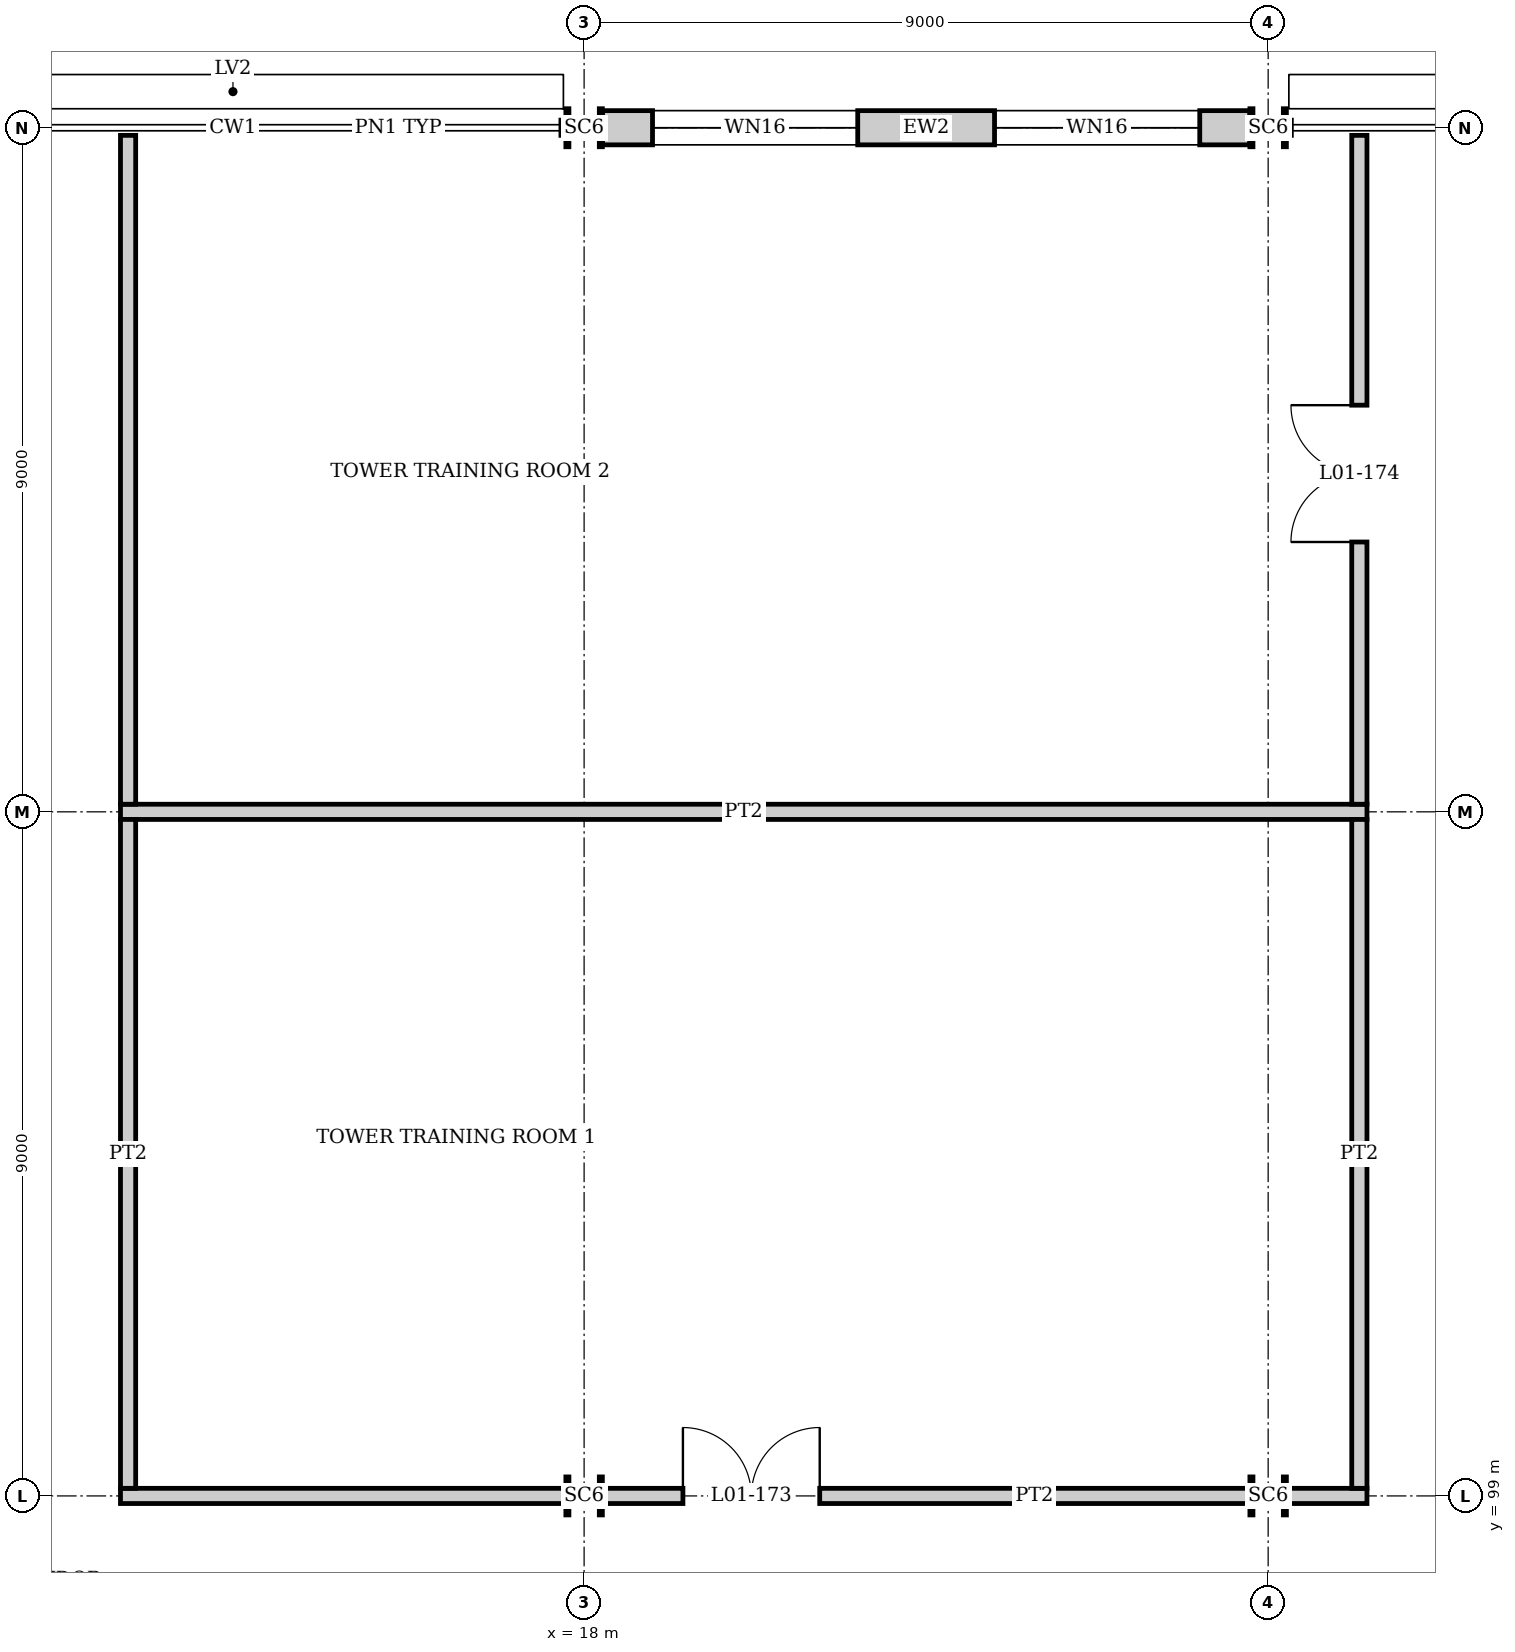
"""IFC4 building model, lengths in metres.
Left out: names, types, materials, properties, quantities, classifications, styles, units other than length and angle.
Written with IfcOpenShell. Run it as: python <this file> out.ifc"""

import sys

from ifc_helpers import new_model, si_unit, direction, frame, frame_2d, origin, origin_2d, place, context, subcontext, project, spatial, rectangle, i_section, extrude, element, fill, save


model = new_model("IFC4")
c1 = context("Model", 3, precision=1e-05, world=origin(), true_north=direction((0.0, 1.0)))
c2 = subcontext(c1, "Body", "Model", "MODEL_VIEW")
j1 = project(units=[si_unit("LENGTHUNIT", "METRE"), si_unit("PLANEANGLEUNIT", "RADIAN")], contexts=[c1])
p1 = place(None, origin())
s1 = spatial("IfcSite", under=j1, at=p1, CompositionType="ELEMENT")
p2 = place(p1, origin())
s2 = spatial("IfcBuilding", under=s1, at=p2, CompositionType="ELEMENT")
p3 = place(p2, frame((0.0, 0.0, 6.0)))
s3 = spatial("IfcBuildingStorey", under=s2, at=p3, CompositionType="ELEMENT", Elevation=6.0)
for number, where, z_axis, x_axis in (
    (1, (18.0, 99.0, 0.0), (0.0, 0.0, 1.0), (0.0, 1.0, 0.0)),
    (2, (18.0, 117.0, 0.0), (0.0, 0.0, 1.0), (0.0, 1.0, 0.0)),
    (3, (27.0, 99.0, 0.0), (0.0, 0.0, 1.0), (0.0, 1.0, 0.0)),
    (4, (27.0, 117.0, 0.0), (0.0, 0.0, 1.0), (0.0, 1.0, 0.0)),
):
    element("IfcColumn", number, at=place(p3, frame(where, z_axis=z_axis, x_axis=x_axis)), inside=s3, PredefinedType="COLUMN", context=c2, shape_type="SweptSolid", body=[
        extrude(i_section(OverallWidth=0.5, OverallDepth=0.48, WebThickness=0.04, FlangeThickness=0.04, at=origin_2d()), origin(), (0.0, 0.0, 1.0), 4.5),
    ])
p4 = place(p3, frame((18.24, 117.0, 0.0), z_axis=(0.0, 0.0, 1.0), x_axis=(1.0, 0.0, 0.0)))
e5 = element("IfcWall", 5, at=p4, inside=s3, PredefinedType="SOLIDWALL", context=c2, shape_type="SweptSolid", body=[
    extrude(rectangle(XDim=8.52, YDim=0.45, at=frame_2d((4.26, 0.0))), origin(), (0.0, 0.0, 1.0), 3.55),
])
p5 = place(p4, frame((0.66, 0.0, 0.9)))
e6 = element("IfcOpeningElement", 6, at=p5, cuts=e5, PredefinedType="OPENING", context=c2, shape_type="SweptSolid", body=[
    extrude(rectangle(XDim=2.7, YDim=1.8, at=frame_2d((1.35, 0.9))), frame((0.0, 0.235, 0.0), z_axis=(0.0, -1.0, 0.0), x_axis=(1.0, 0.0, 0.0)), (0.0, 0.0, 1.0), 0.47),
])
p6 = place(p4, frame((5.16, 0.0, 0.9)))
e7 = element("IfcOpeningElement", 7, at=p6, cuts=e5, PredefinedType="OPENING", context=c2, shape_type="SweptSolid", body=[
    extrude(rectangle(XDim=2.7, YDim=1.8, at=frame_2d((1.35, 0.9))), frame((0.0, 0.235, 0.0), z_axis=(0.0, -1.0, 0.0), x_axis=(1.0, 0.0, 0.0)), (0.0, 0.0, 1.0), 0.47),
])
p7 = place(p3, frame((11.9, 99.0, 0.0), z_axis=(0.0, 0.0, 1.0), x_axis=(1.0, 0.0, 0.0)))
e8 = element("IfcWall", 8, at=p7, inside=s3, PredefinedType="PARTITIONING", context=c2, shape_type="SweptSolid", body=[
    extrude(rectangle(XDim=5.85, YDim=0.2, at=frame_2d((2.925, 0.0))), origin(), (0.0, 0.0, 1.0), 3.64),
])
p8 = place(p3, frame((18.25, 99.0, 0.0), z_axis=(0.0, 0.0, 1.0), x_axis=(1.0, 0.0, 0.0)))
e9 = element("IfcWall", 9, at=p8, inside=s3, PredefinedType="PARTITIONING", context=c2, shape_type="SweptSolid", body=[
    extrude(rectangle(XDim=8.5, YDim=0.2, at=frame_2d((4.25, 0.0))), origin(), (0.0, 0.0, 1.0), 3.64),
])
p9 = place(p8, frame((1.05, 0.0, 0.0)))
e10 = element("IfcOpeningElement", 10, at=p9, cuts=e9, PredefinedType="OPENING", context=c2, shape_type="SweptSolid", body=[
    extrude(rectangle(XDim=1.8, YDim=2.1, at=frame_2d((0.9, 1.05))), frame((0.0, 0.11, 0.0), z_axis=(0.0, -1.0, 0.0), x_axis=(1.0, 0.0, 0.0)), (0.0, 0.0, 1.0), 0.22),
])
p10 = place(p3, frame((27.25, 99.0, 0.0), z_axis=(0.0, 0.0, 1.0), x_axis=(1.0, 0.0, 0.0)))
e11 = element("IfcWall", 11, at=p10, inside=s3, PredefinedType="PARTITIONING", context=c2, shape_type="SweptSolid", body=[
    extrude(rectangle(XDim=1.05, YDim=0.2, at=frame_2d((0.525, 0.0))), origin(), (0.0, 0.0, 1.0), 3.64),
])
p11 = place(p3, frame((11.9, 108.0, 0.0), z_axis=(0.0, 0.0, 1.0), x_axis=(1.0, 0.0, 0.0)))
e12 = element("IfcWall", 12, at=p11, inside=s3, PredefinedType="PARTITIONING", context=c2, shape_type="SweptSolid", body=[
    extrude(rectangle(XDim=16.4, YDim=0.2, at=frame_2d((8.2, 0.0))), origin(), (0.0, 0.0, 1.0), 3.55),
])
p12 = place(p3, frame((12.0, 99.1, 0.0), z_axis=(0.0, 0.0, 1.0), x_axis=(0.0, 1.0, 0.0)))
e13 = element("IfcWall", 13, at=p12, inside=s3, PredefinedType="PARTITIONING", context=c2, shape_type="SweptSolid", body=[
    extrude(rectangle(XDim=8.8, YDim=0.2, at=frame_2d((4.4, 0.0))), origin(), (0.0, 0.0, 1.0), 3.64),
])
p13 = place(p3, frame((12.0, 108.1, 0.0), z_axis=(0.0, 0.0, 1.0), x_axis=(0.0, 1.0, 0.0)))
e14 = element("IfcWall", 14, at=p13, inside=s3, PredefinedType="PARTITIONING", context=c2, shape_type="SweptSolid", body=[
    extrude(rectangle(XDim=8.8, YDim=0.2, at=frame_2d((4.4, 0.0))), origin(), (0.0, 0.0, 1.0), 4.35),
])
p14 = place(p3, frame((28.2, 99.1, 0.0), z_axis=(0.0, 0.0, 1.0), x_axis=(0.0, 1.0, 0.0)))
e15 = element("IfcWall", 15, at=p14, inside=s3, PredefinedType="PARTITIONING", context=c2, shape_type="SweptSolid", body=[
    extrude(rectangle(XDim=8.8, YDim=0.2, at=frame_2d((4.4, 0.0))), origin(), (0.0, 0.0, 1.0), 3.64),
])
p15 = place(p3, frame((28.2, 108.1, 0.0), z_axis=(0.0, 0.0, 1.0), x_axis=(0.0, 1.0, 0.0)))
e16 = element("IfcWall", 16, at=p15, inside=s3, PredefinedType="PARTITIONING", context=c2, shape_type="SweptSolid", body=[
    extrude(rectangle(XDim=8.8, YDim=0.2, at=frame_2d((4.4, 0.0))), origin(), (0.0, 0.0, 1.0), 4.35),
])
p16 = place(p15, frame((3.45, 0.0, 0.0)))
e17 = element("IfcOpeningElement", 17, at=p16, cuts=e16, PredefinedType="OPENING", context=c2, shape_type="SweptSolid", body=[
    extrude(rectangle(XDim=1.8, YDim=2.1, at=frame_2d((0.9, 1.05))), frame((0.0, 0.11, 0.0), z_axis=(0.0, -1.0, 0.0), x_axis=(1.0, 0.0, 0.0)), (0.0, 0.0, 1.0), 0.22),
])
p17 = place(p5, origin())
e18 = element("IfcWindow", 18, at=p17, inside=s3, PartitioningType="SINGLE_PANEL", PredefinedType="WINDOW", context=c2, shape_type="SweptSolid", body=[
    extrude(rectangle(XDim=2.7, YDim=1.8, at=frame_2d((1.35, 0.9))), frame((0.0, 0.03, 0.0), z_axis=(0.0, -1.0, 0.0), x_axis=(1.0, 0.0, 0.0)), (0.0, 0.0, 1.0), 0.06),
])
fill(e6, e18)
p18 = place(p6, origin())
e19 = element("IfcWindow", 19, at=p18, inside=s3, PartitioningType="SINGLE_PANEL", PredefinedType="WINDOW", context=c2, shape_type="SweptSolid", body=[
    extrude(rectangle(XDim=2.7, YDim=1.8, at=frame_2d((1.35, 0.9))), frame((0.0, 0.03, 0.0), z_axis=(0.0, -1.0, 0.0), x_axis=(1.0, 0.0, 0.0)), (0.0, 0.0, 1.0), 0.06),
])
fill(e7, e19)
p19 = place(p9, origin())
e20 = element("IfcDoor", 20, at=p19, inside=s3, OperationType="DOUBLE_DOOR_SINGLE_SWING", PredefinedType="DOOR", context=c2, shape_type="SweptSolid", body=[
    extrude(rectangle(XDim=1.8, YDim=2.1, at=frame_2d((0.9, 1.05))), frame((0.0, 0.025, 0.0), z_axis=(0.0, -1.0, 0.0), x_axis=(1.0, 0.0, 0.0)), (0.0, 0.0, 1.0), 0.05),
])
fill(e10, e20)
p20 = place(p16, origin())
e21 = element("IfcDoor", 21, at=p20, inside=s3, OperationType="DOUBLE_DOOR_SINGLE_SWING", PredefinedType="DOOR", context=c2, shape_type="SweptSolid", body=[
    extrude(rectangle(XDim=1.8, YDim=2.1, at=frame_2d((0.9, 1.05))), frame((0.0, 0.025, 0.0), z_axis=(0.0, -1.0, 0.0), x_axis=(1.0, 0.0, 0.0)), (0.0, 0.0, 1.0), 0.05),
])
fill(e17, e21)
save(model, sys.argv[1])
